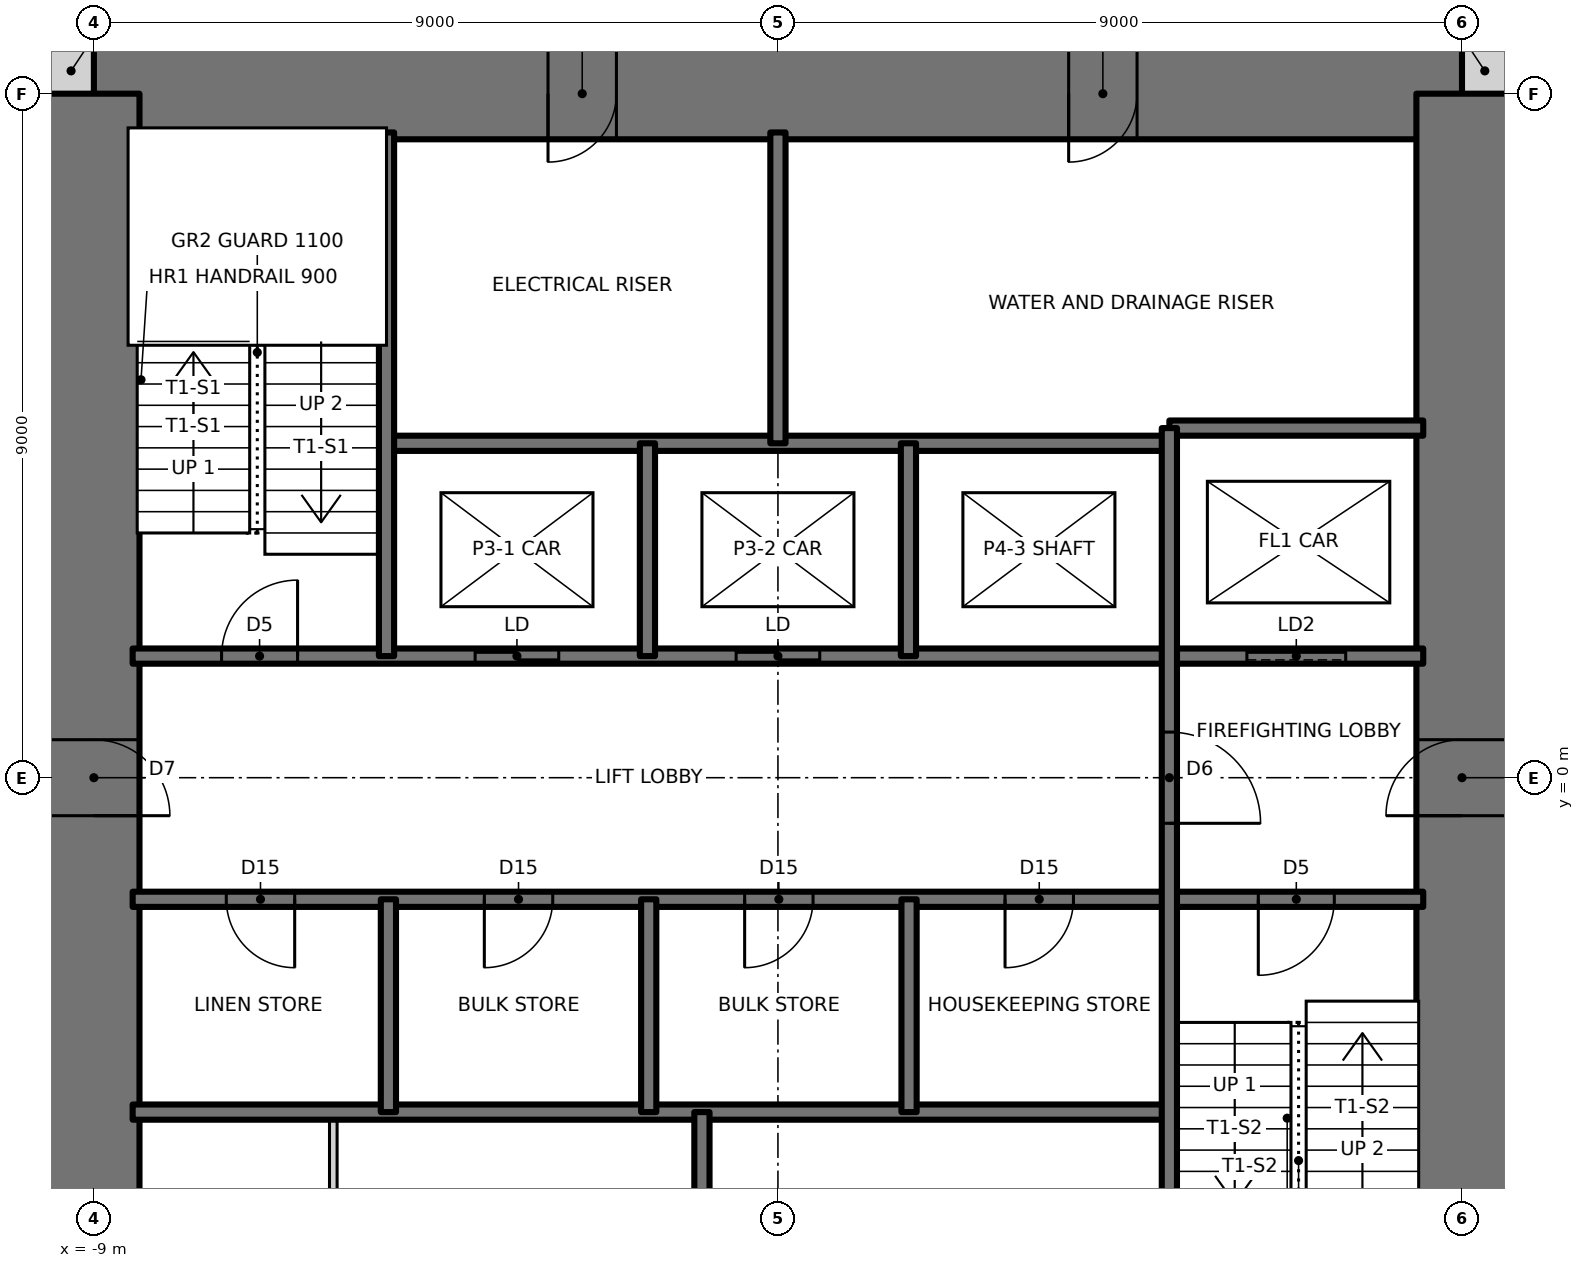
"""IFC4 building model, lengths in metres.
Left out: names, types, materials, properties, quantities, classifications, styles, units other than length and angle.
Written with IfcOpenShell. Run it as: python <this file> out.ifc"""

import sys

from ifc_helpers import new_model, si_unit, direction, frame, frame_2d, origin, place, context, subcontext, project, spatial, rectangle, extrude, element, fill, save


model = new_model("IFC4")
c1 = context("Model", 3, precision=1e-05, world=origin(), true_north=direction((0.0, 1.0)))
c2 = subcontext(c1, "Body", "Model", "MODEL_VIEW")
j1 = project(units=[si_unit("LENGTHUNIT", "METRE"), si_unit("PLANEANGLEUNIT", "RADIAN")], contexts=[c1])
p1 = place(None, origin())
s1 = spatial("IfcSite", under=j1, at=p1, CompositionType="ELEMENT")
p2 = place(p1, origin())
s2 = spatial("IfcBuilding", under=s1, at=p2, CompositionType="ELEMENT")
p3 = place(p2, frame((0.0, 0.0, 167.0)))
s3 = spatial("IfcBuildingStorey", under=s2, at=p3, CompositionType="ELEMENT", Elevation=167.0)
for number, where, z_axis, x_axis in (
    (1, (9.0, 9.3, 0.0), (0.0, 0.0, 1.0), (1.0, 0.0, 0.0)),
    (2, (-9.6, 9.3, 0.0), (0.0, 0.0, 1.0), (1.0, 0.0, 0.0)),
):
    element("IfcWall", number, at=place(p3, frame(where, z_axis=z_axis, x_axis=x_axis)), inside=s3, PredefinedType="SOLIDWALL", context=c2, shape_type="SweptSolid", body=[
        extrude(rectangle(XDim=0.6, YDim=0.6, at=frame_2d((0.3, 0.0))), origin(), (0.0, 0.0, 1.0), 3.5),
    ])
p4 = place(p3, frame((9.0, 9.0, 0.0), z_axis=(0.0, 0.0, 1.0), x_axis=(-1.0, 0.0, 0.0)))
e3 = element("IfcWall", 3, at=p4, inside=s3, PredefinedType="SHEAR", context=c2, shape_type="SweptSolid", body=[
    extrude(rectangle(XDim=18.0, YDim=1.2, at=frame_2d((9.0, 0.0))), origin(), (0.0, 0.0, 1.0), 3.5),
])
p5 = place(p4, frame((11.125, 0.0, 0.0)))
e4 = element("IfcOpeningElement", 4, at=p5, cuts=e3, PredefinedType="OPENING", context=c2, shape_type="SweptSolid", body=[
    extrude(rectangle(XDim=0.9, YDim=2.1, at=frame_2d((0.45, 1.05))), frame((0.0, 0.61, 0.0), z_axis=(0.0, -1.0, 0.0), x_axis=(1.0, 0.0, 0.0)), (0.0, 0.0, 1.0), 1.22),
])
p6 = place(p4, frame((4.275, 0.0, 0.0)))
e5 = element("IfcOpeningElement", 5, at=p6, cuts=e3, PredefinedType="OPENING", context=c2, shape_type="SweptSolid", body=[
    extrude(rectangle(XDim=0.9, YDim=2.1, at=frame_2d((0.45, 1.05))), frame((0.0, 0.61, 0.0), z_axis=(0.0, -1.0, 0.0), x_axis=(1.0, 0.0, 0.0)), (0.0, 0.0, 1.0), 1.22),
])
p7 = place(p3, frame((9.0, -9.0, 0.0), z_axis=(0.0, 0.0, 1.0), x_axis=(0.0, 1.0, 0.0)))
e6 = element("IfcWall", 6, at=p7, inside=s3, PredefinedType="SHEAR", context=c2, shape_type="SweptSolid", body=[
    extrude(rectangle(XDim=18.0, YDim=1.2, at=frame_2d((9.0, 0.0))), origin(), (0.0, 0.0, 1.0), 3.5),
])
p8 = place(p7, frame((8.5, 0.0, 0.0)))
e7 = element("IfcOpeningElement", 7, at=p8, cuts=e6, PredefinedType="OPENING", context=c2, shape_type="SweptSolid", body=[
    extrude(rectangle(XDim=1.0, YDim=2.1, at=frame_2d((0.5, 1.05))), frame((0.0, 0.61, 0.0), z_axis=(0.0, -1.0, 0.0), x_axis=(1.0, 0.0, 0.0)), (0.0, 0.0, 1.0), 1.22),
])
p9 = place(p3, frame((-9.0, 9.0, 0.0), z_axis=(0.0, 0.0, 1.0), x_axis=(0.0, -1.0, 0.0)))
e8 = element("IfcWall", 8, at=p9, inside=s3, PredefinedType="SHEAR", context=c2, shape_type="SweptSolid", body=[
    extrude(rectangle(XDim=18.0, YDim=1.2, at=frame_2d((9.0, 0.0))), origin(), (0.0, 0.0, 1.0), 3.5),
])
p10 = place(p9, frame((8.5, 0.0, 0.0)))
e9 = element("IfcOpeningElement", 9, at=p10, cuts=e8, PredefinedType="OPENING", context=c2, shape_type="SweptSolid", body=[
    extrude(rectangle(XDim=1.0, YDim=2.1, at=frame_2d((0.5, 1.05))), frame((0.0, 0.61, 0.0), z_axis=(0.0, -1.0, 0.0), x_axis=(1.0, 0.0, 0.0)), (0.0, 0.0, 1.0), 1.22),
])
p11 = place(p3, frame((-8.49, -4.4, 0.0), z_axis=(0.0, 0.0, 1.0), x_axis=(1.0, 0.0, 0.0)))
e10 = element("IfcWall", 10, at=p11, inside=s3, PredefinedType="SOLIDWALL", context=c2, shape_type="SweptSolid", body=[
    extrude(rectangle(XDim=13.64, YDim=0.2, at=frame_2d((6.82, 0.0))), origin(), (0.0, 0.0, 1.0), 3.5),
])
p12 = place(p3, frame((-8.49, -1.6, 0.0), z_axis=(0.0, 0.0, 1.0), x_axis=(1.0, 0.0, 0.0)))
e11 = element("IfcWall", 11, at=p12, inside=s3, PredefinedType="SOLIDWALL", context=c2, shape_type="SweptSolid", body=[
    extrude(rectangle(XDim=16.98, YDim=0.2, at=frame_2d((8.49, 0.0))), origin(), (0.0, 0.0, 1.0), 3.5),
])
p13 = place(p12, frame((14.81, 0.0, 0.0)))
e12 = element("IfcOpeningElement", 12, at=p13, cuts=e11, PredefinedType="OPENING", context=c2, shape_type="SweptSolid", body=[
    extrude(rectangle(XDim=1.0, YDim=2.1, at=frame_2d((0.5, 1.05))), frame((0.0, 0.11, 0.0), z_axis=(0.0, -1.0, 0.0), x_axis=(1.0, 0.0, 0.0)), (0.0, 0.0, 1.0), 0.22),
])
p14 = place(p12, frame((1.232, 0.0, 0.0)))
e13 = element("IfcOpeningElement", 13, at=p14, cuts=e11, PredefinedType="OPENING", context=c2, shape_type="SweptSolid", body=[
    extrude(rectangle(XDim=0.9, YDim=2.1, at=frame_2d((0.45, 1.05))), frame((0.0, 0.11, 0.0), z_axis=(0.0, -1.0, 0.0), x_axis=(1.0, 0.0, 0.0)), (0.0, 0.0, 1.0), 0.22),
])
p15 = place(p12, frame((4.627, 0.0, 0.0)))
e14 = element("IfcOpeningElement", 14, at=p15, cuts=e11, PredefinedType="OPENING", context=c2, shape_type="SweptSolid", body=[
    extrude(rectangle(XDim=0.9, YDim=2.1, at=frame_2d((0.45, 1.05))), frame((0.0, 0.11, 0.0), z_axis=(0.0, -1.0, 0.0), x_axis=(1.0, 0.0, 0.0)), (0.0, 0.0, 1.0), 0.22),
])
p16 = place(p12, frame((8.052, 0.0, 0.0)))
e15 = element("IfcOpeningElement", 15, at=p16, cuts=e11, PredefinedType="OPENING", context=c2, shape_type="SweptSolid", body=[
    extrude(rectangle(XDim=0.9, YDim=2.1, at=frame_2d((0.45, 1.05))), frame((0.0, 0.11, 0.0), z_axis=(0.0, -1.0, 0.0), x_axis=(1.0, 0.0, 0.0)), (0.0, 0.0, 1.0), 0.22),
])
p17 = place(p12, frame((11.478, 0.0, 0.0)))
e16 = element("IfcOpeningElement", 16, at=p17, cuts=e11, PredefinedType="OPENING", context=c2, shape_type="SweptSolid", body=[
    extrude(rectangle(XDim=0.9, YDim=2.1, at=frame_2d((0.45, 1.05))), frame((0.0, 0.11, 0.0), z_axis=(0.0, -1.0, 0.0), x_axis=(1.0, 0.0, 0.0)), (0.0, 0.0, 1.0), 0.22),
])
p18 = place(p3, frame((-8.49, 1.6, 0.0), z_axis=(0.0, 0.0, 1.0), x_axis=(1.0, 0.0, 0.0)))
e17 = element("IfcWall", 17, at=p18, inside=s3, PredefinedType="SOLIDWALL", context=c2, shape_type="SweptSolid", body=[
    extrude(rectangle(XDim=16.98, YDim=0.2, at=frame_2d((8.49, 0.0))), origin(), (0.0, 0.0, 1.0), 3.5),
])
p19 = place(p18, frame((1.17, 0.0, 0.0)))
e18 = element("IfcOpeningElement", 18, at=p19, cuts=e17, PredefinedType="OPENING", context=c2, shape_type="SweptSolid", body=[
    extrude(rectangle(XDim=1.0, YDim=2.1, at=frame_2d((0.5, 1.05))), frame((0.0, 0.11, 0.0), z_axis=(0.0, -1.0, 0.0), x_axis=(1.0, 0.0, 0.0)), (0.0, 0.0, 1.0), 0.22),
])
p20 = place(p18, frame((4.506, 0.0, 0.0)))
e19 = element("IfcOpeningElement", 19, at=p20, cuts=e17, PredefinedType="OPENING", context=c2, shape_type="SweptSolid", body=[
    extrude(rectangle(XDim=1.1, YDim=2.1, at=frame_2d((0.55, 1.05))), frame((0.0, 0.11, 0.0), z_axis=(0.0, -1.0, 0.0), x_axis=(1.0, 0.0, 0.0)), (0.0, 0.0, 1.0), 0.22),
])
p21 = place(p18, frame((7.94, 0.0, 0.0)))
e20 = element("IfcOpeningElement", 20, at=p21, cuts=e17, PredefinedType="OPENING", context=c2, shape_type="SweptSolid", body=[
    extrude(rectangle(XDim=1.1, YDim=2.1, at=frame_2d((0.55, 1.05))), frame((0.0, 0.11, 0.0), z_axis=(0.0, -1.0, 0.0), x_axis=(1.0, 0.0, 0.0)), (0.0, 0.0, 1.0), 0.22),
])
p22 = place(p18, frame((14.66, 0.0, 0.0)))
e21 = element("IfcOpeningElement", 21, at=p22, cuts=e17, PredefinedType="OPENING", context=c2, shape_type="SweptSolid", body=[
    extrude(rectangle(XDim=1.3, YDim=2.1, at=frame_2d((0.65, 1.05))), frame((0.0, 0.11, 0.0), z_axis=(0.0, -1.0, 0.0), x_axis=(1.0, 0.0, 0.0)), (0.0, 0.0, 1.0), 0.22),
])
p23 = place(p3, frame((-5.15, 4.4, 0.0), z_axis=(0.0, 0.0, 1.0), x_axis=(1.0, 0.0, 0.0)))
e22 = element("IfcWall", 22, at=p23, inside=s3, PredefinedType="SOLIDWALL", context=c2, shape_type="SweptSolid", body=[
    extrude(rectangle(XDim=10.3, YDim=0.2, at=frame_2d((5.15, 0.0))), origin(), (0.0, 0.0, 1.0), 3.5),
])
p24 = place(p3, frame((5.15, 4.6, 0.0), z_axis=(0.0, 0.0, 1.0), x_axis=(1.0, 0.0, 0.0)))
e23 = element("IfcWall", 23, at=p24, inside=s3, PredefinedType="SOLIDWALL", context=c2, shape_type="SweptSolid", body=[
    extrude(rectangle(XDim=3.34, YDim=0.2, at=frame_2d((1.67, 0.0))), origin(), (0.0, 0.0, 1.0), 3.5),
])
p25 = place(p3, frame((5.15, -8.49, 0.0), z_axis=(0.0, 0.0, 1.0), x_axis=(0.0, 1.0, 0.0)))
e24 = element("IfcWall", 24, at=p25, inside=s3, PredefinedType="SOLIDWALL", context=c2, shape_type="SweptSolid", body=[
    extrude(rectangle(XDim=13.09, YDim=0.2, at=frame_2d((6.545, 0.0))), origin(), (0.0, 0.0, 1.0), 3.5),
])
p26 = place(p25, frame((7.89, 0.0, 0.0)))
e25 = element("IfcOpeningElement", 25, at=p26, cuts=e24, PredefinedType="OPENING", context=c2, shape_type="SweptSolid", body=[
    extrude(rectangle(XDim=1.2, YDim=2.1, at=frame_2d((0.6, 1.05))), frame((0.0, 0.11, 0.0), z_axis=(0.0, -1.0, 0.0), x_axis=(1.0, 0.0, 0.0)), (0.0, 0.0, 1.0), 0.22),
])
for number, where, z_axis, x_axis in (
    (26, (1.725, -4.4, 0.0), (0.0, 0.0, 1.0), (0.0, 1.0, 0.0)),
    (27, (1.717, 1.6, 0.0), (0.0, 0.0, 1.0), (0.0, 1.0, 0.0)),
):
    element("IfcWall", number, at=place(p3, frame(where, z_axis=z_axis, x_axis=x_axis)), inside=s3, PredefinedType="SOLIDWALL", context=c2, shape_type="SweptSolid", body=[
        extrude(rectangle(XDim=2.8, YDim=0.2, at=frame_2d((1.4, 0.0))), origin(), (0.0, 0.0, 1.0), 3.5),
    ])
for number, where, z_axis, x_axis in (
    (28, (0.0, 4.4, 0.0), (0.0, 0.0, 1.0), (0.0, 1.0, 0.0)),
    (29, (-1.0, -8.49, 0.0), (0.0, 0.0, 1.0), (0.0, 1.0, 0.0)),
):
    element("IfcWall", number, at=place(p3, frame(where, z_axis=z_axis, x_axis=x_axis)), inside=s3, PredefinedType="SOLIDWALL", context=c2, shape_type="SweptSolid", body=[
        extrude(rectangle(XDim=4.09, YDim=0.2, at=frame_2d((2.045, 0.0))), origin(), (0.0, 0.0, 1.0), 3.5),
    ])
for number, where, z_axis, x_axis in (
    (30, (-1.7, -4.4, 0.0), (0.0, 0.0, 1.0), (0.0, 1.0, 0.0)),
    (31, (-1.717, 1.6, 0.0), (0.0, 0.0, 1.0), (0.0, 1.0, 0.0)),
    (32, (-5.125, -4.4, 0.0), (0.0, 0.0, 1.0), (0.0, 1.0, 0.0)),
):
    element("IfcWall", number, at=place(p3, frame(where, z_axis=z_axis, x_axis=x_axis)), inside=s3, PredefinedType="SOLIDWALL", context=c2, shape_type="SweptSolid", body=[
        extrude(rectangle(XDim=2.8, YDim=0.2, at=frame_2d((1.4, 0.0))), origin(), (0.0, 0.0, 1.0), 3.5),
    ])
p27 = place(p3, frame((-5.15, 1.6, 0.0), z_axis=(0.0, 0.0, 1.0), x_axis=(0.0, 1.0, 0.0)))
e33 = element("IfcWall", 33, at=p27, inside=s3, PredefinedType="SOLIDWALL", context=c2, shape_type="SweptSolid", body=[
    extrude(rectangle(XDim=6.89, YDim=0.2, at=frame_2d((3.445, 0.0))), origin(), (0.0, 0.0, 1.0), 3.5),
])
p28 = place(p3, frame((-5.85, -8.49, 0.0), z_axis=(0.0, 0.0, 1.0), x_axis=(0.0, 1.0, 0.0)))
e34 = element("IfcWall", 34, at=p28, inside=s3, PredefinedType="PARTITIONING", context=c2, shape_type="SweptSolid", body=[
    extrude(rectangle(XDim=4.09, YDim=0.1, at=frame_2d((2.045, 0.0))), origin(), (0.0, 0.0, 1.0), 3.3),
])
p29 = place(p28, frame((1.595, 0.0, 0.0)))
e35 = element("IfcOpeningElement", 35, at=p29, cuts=e34, PredefinedType="OPENING", context=c2, shape_type="SweptSolid", body=[
    extrude(rectangle(XDim=0.9, YDim=2.1, at=frame_2d((0.45, 1.05))), frame((0.0, 0.06, 0.0), z_axis=(0.0, -1.0, 0.0), x_axis=(1.0, 0.0, 0.0)), (0.0, 0.0, 1.0), 0.12),
])
p30 = place(p19, origin())
e36 = element("IfcDoor", 36, at=p30, inside=s3, OperationType="SINGLE_SWING_RIGHT", PredefinedType="DOOR", context=c2, shape_type="SweptSolid", body=[
    extrude(rectangle(XDim=1.0, YDim=2.1, at=frame_2d((0.5, 1.05))), frame((0.0, 0.025, 0.0), z_axis=(0.0, -1.0, 0.0), x_axis=(1.0, 0.0, 0.0)), (0.0, 0.0, 1.0), 0.05),
])
fill(e18, e36)
p31 = place(p13, frame((1.0, 0.0, 0.0), z_axis=(0.0, 0.0, 1.0), x_axis=(-1.0, 0.0, 0.0)))
e37 = element("IfcDoor", 37, at=p31, inside=s3, OperationType="SINGLE_SWING_RIGHT", PredefinedType="DOOR", context=c2, shape_type="SweptSolid", body=[
    extrude(rectangle(XDim=1.0, YDim=2.1, at=frame_2d((0.5, 1.05))), frame((0.0, 0.025, 0.0), z_axis=(0.0, -1.0, 0.0), x_axis=(1.0, 0.0, 0.0)), (0.0, 0.0, 1.0), 0.05),
])
fill(e12, e37)
p32 = place(p26, frame((1.2, 0.0, 0.0), z_axis=(0.0, 0.0, 1.0), x_axis=(-1.0, 0.0, 0.0)))
e38 = element("IfcDoor", 38, at=p32, inside=s3, OperationType="SINGLE_SWING_RIGHT", PredefinedType="DOOR", context=c2, shape_type="SweptSolid", body=[
    extrude(rectangle(XDim=1.2, YDim=2.1, at=frame_2d((0.6, 1.05))), frame((0.0, 0.025, 0.0), z_axis=(0.0, -1.0, 0.0), x_axis=(1.0, 0.0, 0.0)), (0.0, 0.0, 1.0), 0.05),
])
fill(e25, e38)
p33 = place(p14, frame((0.9, 0.0, 0.0), z_axis=(0.0, 0.0, 1.0), x_axis=(-1.0, 0.0, 0.0)))
e39 = element("IfcDoor", 39, at=p33, inside=s3, OperationType="SINGLE_SWING_LEFT", PredefinedType="DOOR", context=c2, shape_type="SweptSolid", body=[
    extrude(rectangle(XDim=0.9, YDim=2.1, at=frame_2d((0.45, 1.05))), frame((0.0, 0.025, 0.0), z_axis=(0.0, -1.0, 0.0), x_axis=(1.0, 0.0, 0.0)), (0.0, 0.0, 1.0), 0.05),
])
fill(e13, e39)
p34 = place(p15, frame((0.9, 0.0, 0.0), z_axis=(0.0, 0.0, 1.0), x_axis=(-1.0, 0.0, 0.0)))
e40 = element("IfcDoor", 40, at=p34, inside=s3, OperationType="SINGLE_SWING_RIGHT", PredefinedType="DOOR", context=c2, shape_type="SweptSolid", body=[
    extrude(rectangle(XDim=0.9, YDim=2.1, at=frame_2d((0.45, 1.05))), frame((0.0, 0.025, 0.0), z_axis=(0.0, -1.0, 0.0), x_axis=(1.0, 0.0, 0.0)), (0.0, 0.0, 1.0), 0.05),
])
fill(e14, e40)
p35 = place(p16, frame((0.9, 0.0, 0.0), z_axis=(0.0, 0.0, 1.0), x_axis=(-1.0, 0.0, 0.0)))
e41 = element("IfcDoor", 41, at=p35, inside=s3, OperationType="SINGLE_SWING_RIGHT", PredefinedType="DOOR", context=c2, shape_type="SweptSolid", body=[
    extrude(rectangle(XDim=0.9, YDim=2.1, at=frame_2d((0.45, 1.05))), frame((0.0, 0.025, 0.0), z_axis=(0.0, -1.0, 0.0), x_axis=(1.0, 0.0, 0.0)), (0.0, 0.0, 1.0), 0.05),
])
fill(e15, e41)
p36 = place(p17, frame((0.9, 0.0, 0.0), z_axis=(0.0, 0.0, 1.0), x_axis=(-1.0, 0.0, 0.0)))
e42 = element("IfcDoor", 42, at=p36, inside=s3, OperationType="SINGLE_SWING_RIGHT", PredefinedType="DOOR", context=c2, shape_type="SweptSolid", body=[
    extrude(rectangle(XDim=0.9, YDim=2.1, at=frame_2d((0.45, 1.05))), frame((0.0, 0.025, 0.0), z_axis=(0.0, -1.0, 0.0), x_axis=(1.0, 0.0, 0.0)), (0.0, 0.0, 1.0), 0.05),
])
fill(e16, e42)
p37 = place(p10, origin())
e43 = element("IfcDoor", 43, at=p37, inside=s3, OperationType="SINGLE_SWING_RIGHT", PredefinedType="DOOR", context=c2, shape_type="SweptSolid", body=[
    extrude(rectangle(XDim=1.0, YDim=2.1, at=frame_2d((0.5, 1.05))), frame((0.0, 0.025, 0.0), z_axis=(0.0, -1.0, 0.0), x_axis=(1.0, 0.0, 0.0)), (0.0, 0.0, 1.0), 0.05),
])
fill(e9, e43)
p38 = place(p8, origin())
e44 = element("IfcDoor", 44, at=p38, inside=s3, OperationType="SINGLE_SWING_LEFT", PredefinedType="DOOR", context=c2, shape_type="SweptSolid", body=[
    extrude(rectangle(XDim=1.0, YDim=2.1, at=frame_2d((0.5, 1.05))), frame((0.0, 0.025, 0.0), z_axis=(0.0, -1.0, 0.0), x_axis=(1.0, 0.0, 0.0)), (0.0, 0.0, 1.0), 0.05),
])
fill(e7, e44)
p39 = place(p5, origin())
e45 = element("IfcDoor", 45, at=p39, inside=s3, OperationType="SINGLE_SWING_RIGHT", PredefinedType="DOOR", context=c2, shape_type="SweptSolid", body=[
    extrude(rectangle(XDim=0.9, YDim=2.1, at=frame_2d((0.45, 1.05))), frame((0.0, 0.025, 0.0), z_axis=(0.0, -1.0, 0.0), x_axis=(1.0, 0.0, 0.0)), (0.0, 0.0, 1.0), 0.05),
])
fill(e4, e45)
p40 = place(p6, origin())
e46 = element("IfcDoor", 46, at=p40, inside=s3, OperationType="SINGLE_SWING_RIGHT", PredefinedType="DOOR", context=c2, shape_type="SweptSolid", body=[
    extrude(rectangle(XDim=0.9, YDim=2.1, at=frame_2d((0.45, 1.05))), frame((0.0, 0.025, 0.0), z_axis=(0.0, -1.0, 0.0), x_axis=(1.0, 0.0, 0.0)), (0.0, 0.0, 1.0), 0.05),
])
fill(e5, e46)
p41 = place(p20, origin())
e47 = element("IfcDoor", 47, at=p41, inside=s3, OperationType="DOUBLE_DOOR_SLIDING", PredefinedType="DOOR", context=c2, shape_type="SweptSolid", body=[
    extrude(rectangle(XDim=1.1, YDim=2.1, at=frame_2d((0.55, 1.05))), frame((0.0, 0.025, 0.0), z_axis=(0.0, -1.0, 0.0), x_axis=(1.0, 0.0, 0.0)), (0.0, 0.0, 1.0), 0.05),
])
fill(e19, e47)
p42 = place(p21, origin())
e48 = element("IfcDoor", 48, at=p42, inside=s3, OperationType="DOUBLE_DOOR_SLIDING", PredefinedType="DOOR", context=c2, shape_type="SweptSolid", body=[
    extrude(rectangle(XDim=1.1, YDim=2.1, at=frame_2d((0.55, 1.05))), frame((0.0, 0.025, 0.0), z_axis=(0.0, -1.0, 0.0), x_axis=(1.0, 0.0, 0.0)), (0.0, 0.0, 1.0), 0.05),
])
fill(e20, e48)
p43 = place(p22, origin())
e49 = element("IfcDoor", 49, at=p43, inside=s3, OperationType="SLIDING_TO_LEFT", PredefinedType="DOOR", context=c2, shape_type="SweptSolid", body=[
    extrude(rectangle(XDim=1.3, YDim=2.1, at=frame_2d((0.65, 1.05))), frame((0.0, 0.025, 0.0), z_axis=(0.0, -1.0, 0.0), x_axis=(1.0, 0.0, 0.0)), (0.0, 0.0, 1.0), 0.05),
])
fill(e21, e49)
save(model, sys.argv[1])
